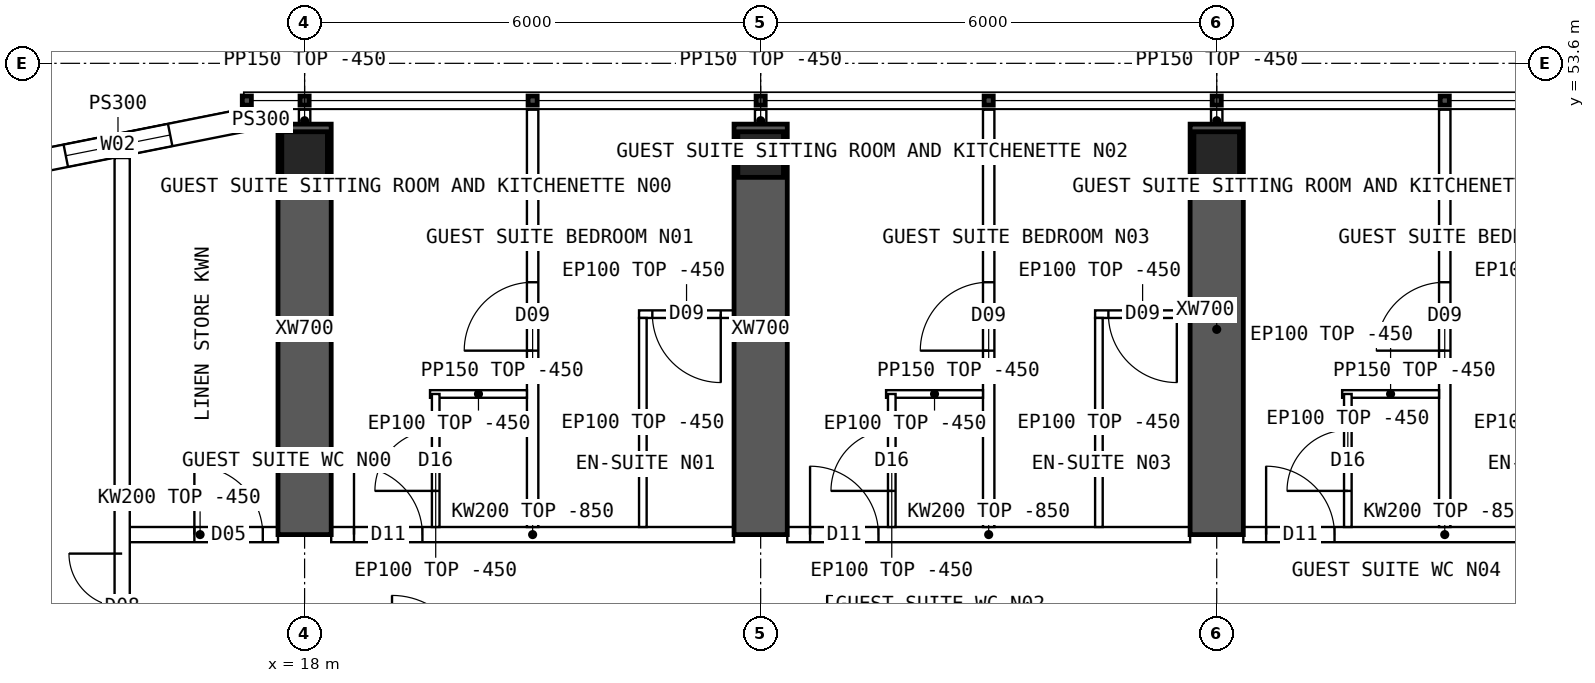
"""IFC4 building model, lengths in metres.
Left out: names, types, materials, properties, quantities, classifications, styles, units other than length and angle.
Written with IfcOpenShell. Run it as: python <this file> out.ifc"""

import sys

from ifc_helpers import new_model, si_unit, direction, frame, frame_2d, origin, origin_2d, place, context, subcontext, project, spatial, polyline, rectangle, hollow_rectangle, outline, extrude, element, fill, save


model = new_model("IFC4")
c1 = context("Model", 3, precision=1e-05, world=origin(), true_north=direction((0.0, 1.0)))
c2 = subcontext(c1, "Body", "Model", "MODEL_VIEW")
j1 = project(units=[si_unit("LENGTHUNIT", "METRE"), si_unit("PLANEANGLEUNIT", "RADIAN")], contexts=[c1])
p1 = place(None, origin())
s1 = spatial("IfcSite", under=j1, at=p1, CompositionType="ELEMENT")
p2 = place(p1, origin())
s2 = spatial("IfcBuilding", under=s1, at=p2, CompositionType="ELEMENT")
p3 = place(p2, frame((0.0, 0.0, 242.8)))
s3 = spatial("IfcBuildingStorey", under=s2, at=p3, CompositionType="ELEMENT", Elevation=242.8)
for number, where, z_axis, x_axis in (
    (1, (18.0, 52.4, 0.0), (0.0, 0.0, 1.0), (1.0, 0.0, 0.0)),
    (2, (24.0, 52.4, 0.0), (0.0, 0.0, 1.0), (1.0, 0.0, 0.0)),
    (3, (30.0, 52.4, 0.0), (0.0, 0.0, 1.0), (1.0, 0.0, 0.0)),
):
    element("IfcColumn", number, at=place(p3, frame(where, z_axis=z_axis, x_axis=x_axis)), inside=s3, PredefinedType="COLUMN", context=c2, shape_type="SweptSolid", body=[
        extrude(hollow_rectangle(XDim=0.6, YDim=0.6, WallThickness=0.06, at=origin_2d()), origin(), (0.0, 0.0, 1.0), 3.75),
    ])
for number, where, z_axis, x_axis in (
    (4, (18.0, 47.4, 0.0), (0.0, 0.0, 1.0), (0.0, 1.0, 0.0)),
    (5, (24.0, 47.4, 0.0), (0.0, 0.0, 1.0), (0.0, 1.0, 0.0)),
    (6, (30.0, 47.4, 0.0), (0.0, 0.0, 1.0), (0.0, 1.0, 0.0)),
):
    element("IfcWall", number, at=place(p3, frame(where, z_axis=z_axis, x_axis=x_axis)), inside=s3, PredefinedType="SHEAR", context=c2, shape_type="SweptSolid", body=[
        extrude(rectangle(XDim=5.4, YDim=0.7, at=frame_2d((2.7, 0.0))), origin(), (0.0, 0.0, 1.0), 3.75),
    ])
p4 = place(p3, frame((17.2, 52.85, 0.0), z_axis=(0.0, 0.0, 1.0), x_axis=(-0.98078325777, -0.195100490205, 0.0)))
e7 = element("IfcWall", 7, at=p4, inside=s3, PredefinedType="SOLIDWALL", context=c2, shape_type="SweptSolid", body=[
    extrude(outline(polyline([(-0.03, -0.15), (3.405, -0.15), (3.345, 0.15), (0.03, 0.15), (-0.03, -0.15)])), origin(), (0.0, 0.0, 1.0), 3.3),
])
p5 = place(p4, frame((0.988, 0.0, 0.9)))
e8 = element("IfcOpeningElement", 8, at=p5, cuts=e7, PredefinedType="OPENING", context=c2, shape_type="SweptSolid", body=[
    extrude(rectangle(XDim=1.4, YDim=1.8, at=frame_2d((0.7, 0.9))), frame((0.0, 0.16, 0.0), z_axis=(0.0, -1.0, 0.0), x_axis=(1.0, 0.0, 0.0)), (0.0, 0.0, 1.0), 0.32),
])
p6 = place(p3, frame((17.2, 52.85, 0.0), z_axis=(0.0, 0.0, 1.0), x_axis=(1.0, 0.0, 0.0)))
e9 = element("IfcWall", 9, at=p6, inside=s3, PredefinedType="SOLIDWALL", context=c2, shape_type="SweptSolid", body=[
    extrude(rectangle(XDim=0.45, YDim=0.3, at=frame_2d((0.225, 0.0))), origin(), (0.0, 0.0, 1.0), 3.3),
])
p7 = place(p3, frame((15.6, 47.4, 0.0), z_axis=(0.0, 0.0, 1.0), x_axis=(1.0, 0.0, 0.0)))
e10 = element("IfcWall", 10, at=p7, inside=s3, PredefinedType="SOLIDWALL", context=c2, shape_type="SweptSolid", body=[
    extrude(rectangle(XDim=2.05, YDim=0.2, at=frame_2d((1.025, 0.0))), origin(), (0.0, 0.0, 1.0), 3.3),
])
p8 = place(p7, frame((0.95, 0.0, 0.0)))
e11 = element("IfcOpeningElement", 11, at=p8, cuts=e10, PredefinedType="OPENING", context=c2, shape_type="SweptSolid", body=[
    extrude(rectangle(XDim=0.9, YDim=2.1, at=frame_2d((0.45, 1.05))), frame((0.0, 0.11, 0.0), z_axis=(0.0, -1.0, 0.0), x_axis=(1.0, 0.0, 0.0)), (0.0, 0.0, 1.0), 0.22),
])
p9 = place(p3, frame((18.35, 47.4, 0.0), z_axis=(0.0, 0.0, 1.0), x_axis=(1.0, 0.0, 0.0)))
e12 = element("IfcWall", 12, at=p9, inside=s3, PredefinedType="SOLIDWALL", context=c2, shape_type="SweptSolid", body=[
    extrude(outline(polyline([(0.0, 0.0), (5.3, 0.0), (5.3, 2.9), (0.0, 2.9), (0.0, 0.0)])), frame((0.0, 0.1, 0.0), z_axis=(0.0, -1.0, 0.0), x_axis=(1.0, 0.0, 0.0)), (0.0, 0.0, 1.0), 0.2),
])
p10 = place(p9, frame((0.3, 0.0, 0.0)))
e13 = element("IfcOpeningElement", 13, at=p10, cuts=e12, PredefinedType="OPENING", context=c2, shape_type="SweptSolid", body=[
    extrude(rectangle(XDim=0.9, YDim=2.1, at=frame_2d((0.45, 1.05))), frame((0.0, 0.11, 0.0), z_axis=(0.0, -1.0, 0.0), x_axis=(1.0, 0.0, 0.0)), (0.0, 0.0, 1.0), 0.22),
])
p11 = place(p3, frame((24.35, 47.4, 0.0), z_axis=(0.0, 0.0, 1.0), x_axis=(1.0, 0.0, 0.0)))
e14 = element("IfcWall", 14, at=p11, inside=s3, PredefinedType="SOLIDWALL", context=c2, shape_type="SweptSolid", body=[
    extrude(outline(polyline([(0.0, 0.0), (5.3, 0.0), (5.3, 2.9), (0.0, 2.9), (0.0, 0.0)])), frame((0.0, 0.1, 0.0), z_axis=(0.0, -1.0, 0.0), x_axis=(1.0, 0.0, 0.0)), (0.0, 0.0, 1.0), 0.2),
])
p12 = place(p11, frame((0.3, 0.0, 0.0)))
e15 = element("IfcOpeningElement", 15, at=p12, cuts=e14, PredefinedType="OPENING", context=c2, shape_type="SweptSolid", body=[
    extrude(rectangle(XDim=0.9, YDim=2.1, at=frame_2d((0.45, 1.05))), frame((0.0, 0.11, 0.0), z_axis=(0.0, -1.0, 0.0), x_axis=(1.0, 0.0, 0.0)), (0.0, 0.0, 1.0), 0.22),
])
p13 = place(p3, frame((30.35, 47.4, 0.0), z_axis=(0.0, 0.0, 1.0), x_axis=(1.0, 0.0, 0.0)))
e16 = element("IfcWall", 16, at=p13, inside=s3, PredefinedType="SOLIDWALL", context=c2, shape_type="SweptSolid", body=[
    extrude(outline(polyline([(0.0, 0.0), (5.3, 0.0), (5.3, 2.9), (0.0, 2.9), (0.0, 0.0)])), frame((0.0, 0.1, 0.0), z_axis=(0.0, -1.0, 0.0), x_axis=(1.0, 0.0, 0.0)), (0.0, 0.0, 1.0), 0.2),
])
p14 = place(p13, frame((0.3, 0.0, 0.0)))
e17 = element("IfcOpeningElement", 17, at=p14, cuts=e16, PredefinedType="OPENING", context=c2, shape_type="SweptSolid", body=[
    extrude(rectangle(XDim=0.9, YDim=2.1, at=frame_2d((0.45, 1.05))), frame((0.0, 0.11, 0.0), z_axis=(0.0, -1.0, 0.0), x_axis=(1.0, 0.0, 0.0)), (0.0, 0.0, 1.0), 0.22),
])
p15 = place(p3, frame((21.0, 52.99, 0.0), z_axis=(0.0, 0.0, 1.0), x_axis=(0.0, -1.0, 0.0)))
e18 = element("IfcWall", 18, at=p15, inside=s3, PredefinedType="PARTITIONING", context=c2, shape_type="SweptSolid", body=[
    extrude(outline(polyline([(0.0, 0.0), (5.49, 0.0), (5.49, 2.9), (5.442, 2.9), (5.44, 3.3), (0.792, 3.3), (0.79, 2.9), (0.392, 2.9), (0.39, 3.3), (0.0, 3.3), (0.0, 0.0)])), frame((0.0, 0.075, 0.0), z_axis=(0.0, -1.0, 0.0), x_axis=(1.0, 0.0, 0.0)), (0.0, 0.0, 1.0), 0.15),
])
p16 = place(p15, frame((2.27, 0.0, 0.0)))
e19 = element("IfcOpeningElement", 19, at=p16, cuts=e18, PredefinedType="OPENING", context=c2, shape_type="SweptSolid", body=[
    extrude(rectangle(XDim=0.9, YDim=2.1, at=frame_2d((0.45, 1.05))), frame((0.0, 0.085, 0.0), z_axis=(0.0, -1.0, 0.0), x_axis=(1.0, 0.0, 0.0)), (0.0, 0.0, 1.0), 0.17),
])
p17 = place(p3, frame((22.4, 50.3, 0.0), z_axis=(0.0, 0.0, 1.0), x_axis=(1.0, 0.0, 0.0)))
e20 = element("IfcWall", 20, at=p17, inside=s3, PredefinedType="PARTITIONING", context=c2, shape_type="SweptSolid", body=[
    extrude(rectangle(XDim=1.25, YDim=0.1, at=frame_2d((0.625, 0.0))), origin(), (0.0, 0.0, 1.0), 3.3),
])
p18 = place(p17, frame((0.175, 0.0, 0.0)))
e21 = element("IfcOpeningElement", 21, at=p18, cuts=e20, PredefinedType="OPENING", context=c2, shape_type="SweptSolid", body=[
    extrude(rectangle(XDim=0.9, YDim=2.1, at=frame_2d((0.45, 1.05))), frame((0.0, 0.06, 0.0), z_axis=(0.0, -1.0, 0.0), x_axis=(1.0, 0.0, 0.0)), (0.0, 0.0, 1.0), 0.12),
])
p19 = place(p3, frame((22.45, 50.25, 0.0), z_axis=(0.0, 0.0, 1.0), x_axis=(0.0, -1.0, 0.0)))
e22 = element("IfcWall", 22, at=p19, inside=s3, PredefinedType="PARTITIONING", context=c2, shape_type="SweptSolid", body=[
    extrude(outline(polyline([(0.0, 0.0), (2.75, 0.0), (2.75, 2.9), (2.702, 2.9), (2.7, 3.3), (0.0, 3.3), (0.0, 0.0)])), frame((0.0, 0.05, 0.0), z_axis=(0.0, -1.0, 0.0), x_axis=(1.0, 0.0, 0.0)), (0.0, 0.0, 1.0), 0.1),
])
p20 = place(p3, frame((19.65, 49.25, 0.0), z_axis=(0.0, 0.0, 1.0), x_axis=(1.0, 0.0, 0.0)))
e23 = element("IfcWall", 23, at=p20, inside=s3, PredefinedType="PARTITIONING", context=c2, shape_type="SweptSolid", body=[
    extrude(rectangle(XDim=1.275, YDim=0.1, at=frame_2d((0.638, 0.0))), origin(), (0.0, 0.0, 1.0), 3.3),
])
p21 = place(p3, frame((19.725, 49.25, 0.0), z_axis=(0.0, 0.0, 1.0), x_axis=(0.0, -1.0, 0.0)))
e24 = element("IfcWall", 24, at=p21, inside=s3, PredefinedType="PARTITIONING", context=c2, shape_type="SweptSolid", body=[
    extrude(outline(polyline([(0.0, 0.0), (1.75, 0.0), (1.75, 2.9), (1.702, 2.9), (1.7, 3.3), (0.0, 3.3), (0.0, 0.0)])), frame((0.0, 0.05, 0.0), z_axis=(0.0, -1.0, 0.0), x_axis=(1.0, 0.0, 0.0)), (0.0, 0.0, 1.0), 0.1),
])
p22 = place(p21, frame((0.475, 0.0, 0.0)))
e25 = element("IfcOpeningElement", 25, at=p22, cuts=e24, PredefinedType="OPENING", context=c2, shape_type="SweptSolid", body=[
    extrude(rectangle(XDim=0.8, YDim=2.1, at=frame_2d((0.4, 1.05))), frame((0.0, 0.06, 0.0), z_axis=(0.0, -1.0, 0.0), x_axis=(1.0, 0.0, 0.0)), (0.0, 0.0, 1.0), 0.12),
])
p23 = place(p3, frame((27.0, 52.99, 0.0), z_axis=(0.0, 0.0, 1.0), x_axis=(0.0, -1.0, 0.0)))
e26 = element("IfcWall", 26, at=p23, inside=s3, PredefinedType="PARTITIONING", context=c2, shape_type="SweptSolid", body=[
    extrude(outline(polyline([(0.0, 0.0), (5.49, 0.0), (5.49, 2.9), (5.442, 2.9), (5.44, 3.3), (0.792, 3.3), (0.79, 2.9), (0.392, 2.9), (0.39, 3.3), (0.0, 3.3), (0.0, 0.0)])), frame((0.0, 0.075, 0.0), z_axis=(0.0, -1.0, 0.0), x_axis=(1.0, 0.0, 0.0)), (0.0, 0.0, 1.0), 0.15),
])
p24 = place(p23, frame((2.27, 0.0, 0.0)))
e27 = element("IfcOpeningElement", 27, at=p24, cuts=e26, PredefinedType="OPENING", context=c2, shape_type="SweptSolid", body=[
    extrude(rectangle(XDim=0.9, YDim=2.1, at=frame_2d((0.45, 1.05))), frame((0.0, 0.085, 0.0), z_axis=(0.0, -1.0, 0.0), x_axis=(1.0, 0.0, 0.0)), (0.0, 0.0, 1.0), 0.17),
])
p25 = place(p3, frame((28.4, 50.3, 0.0), z_axis=(0.0, 0.0, 1.0), x_axis=(1.0, 0.0, 0.0)))
e28 = element("IfcWall", 28, at=p25, inside=s3, PredefinedType="PARTITIONING", context=c2, shape_type="SweptSolid", body=[
    extrude(rectangle(XDim=1.25, YDim=0.1, at=frame_2d((0.625, 0.0))), origin(), (0.0, 0.0, 1.0), 3.3),
])
p26 = place(p25, frame((0.175, 0.0, 0.0)))
e29 = element("IfcOpeningElement", 29, at=p26, cuts=e28, PredefinedType="OPENING", context=c2, shape_type="SweptSolid", body=[
    extrude(rectangle(XDim=0.9, YDim=2.1, at=frame_2d((0.45, 1.05))), frame((0.0, 0.06, 0.0), z_axis=(0.0, -1.0, 0.0), x_axis=(1.0, 0.0, 0.0)), (0.0, 0.0, 1.0), 0.12),
])
p27 = place(p3, frame((28.45, 50.25, 0.0), z_axis=(0.0, 0.0, 1.0), x_axis=(0.0, -1.0, 0.0)))
e30 = element("IfcWall", 30, at=p27, inside=s3, PredefinedType="PARTITIONING", context=c2, shape_type="SweptSolid", body=[
    extrude(outline(polyline([(0.0, 0.0), (2.75, 0.0), (2.75, 2.9), (2.702, 2.9), (2.7, 3.3), (0.0, 3.3), (0.0, 0.0)])), frame((0.0, 0.05, 0.0), z_axis=(0.0, -1.0, 0.0), x_axis=(1.0, 0.0, 0.0)), (0.0, 0.0, 1.0), 0.1),
])
p28 = place(p3, frame((25.65, 49.25, 0.0), z_axis=(0.0, 0.0, 1.0), x_axis=(1.0, 0.0, 0.0)))
e31 = element("IfcWall", 31, at=p28, inside=s3, PredefinedType="PARTITIONING", context=c2, shape_type="SweptSolid", body=[
    extrude(rectangle(XDim=1.275, YDim=0.1, at=frame_2d((0.638, 0.0))), origin(), (0.0, 0.0, 1.0), 3.3),
])
p29 = place(p3, frame((25.725, 49.25, 0.0), z_axis=(0.0, 0.0, 1.0), x_axis=(0.0, -1.0, 0.0)))
e32 = element("IfcWall", 32, at=p29, inside=s3, PredefinedType="PARTITIONING", context=c2, shape_type="SweptSolid", body=[
    extrude(outline(polyline([(0.0, 0.0), (1.75, 0.0), (1.75, 2.9), (1.702, 2.9), (1.7, 3.3), (0.0, 3.3), (0.0, 0.0)])), frame((0.0, 0.05, 0.0), z_axis=(0.0, -1.0, 0.0), x_axis=(1.0, 0.0, 0.0)), (0.0, 0.0, 1.0), 0.1),
])
p30 = place(p29, frame((0.475, 0.0, 0.0)))
e33 = element("IfcOpeningElement", 33, at=p30, cuts=e32, PredefinedType="OPENING", context=c2, shape_type="SweptSolid", body=[
    extrude(rectangle(XDim=0.8, YDim=2.1, at=frame_2d((0.4, 1.05))), frame((0.0, 0.06, 0.0), z_axis=(0.0, -1.0, 0.0), x_axis=(1.0, 0.0, 0.0)), (0.0, 0.0, 1.0), 0.12),
])
p31 = place(p3, frame((33.0, 52.99, 0.0), z_axis=(0.0, 0.0, 1.0), x_axis=(0.0, -1.0, 0.0)))
e34 = element("IfcWall", 34, at=p31, inside=s3, PredefinedType="PARTITIONING", context=c2, shape_type="SweptSolid", body=[
    extrude(outline(polyline([(0.0, 0.0), (5.49, 0.0), (5.49, 2.9), (5.442, 2.9), (5.44, 3.3), (0.792, 3.3), (0.79, 2.9), (0.392, 2.9), (0.39, 3.3), (0.0, 3.3), (0.0, 0.0)])), frame((0.0, 0.075, 0.0), z_axis=(0.0, -1.0, 0.0), x_axis=(1.0, 0.0, 0.0)), (0.0, 0.0, 1.0), 0.15),
])
p32 = place(p31, frame((2.27, 0.0, 0.0)))
e35 = element("IfcOpeningElement", 35, at=p32, cuts=e34, PredefinedType="OPENING", context=c2, shape_type="SweptSolid", body=[
    extrude(rectangle(XDim=0.9, YDim=2.1, at=frame_2d((0.45, 1.05))), frame((0.0, 0.085, 0.0), z_axis=(0.0, -1.0, 0.0), x_axis=(1.0, 0.0, 0.0)), (0.0, 0.0, 1.0), 0.17),
])
p33 = place(p3, frame((31.65, 49.25, 0.0), z_axis=(0.0, 0.0, 1.0), x_axis=(1.0, 0.0, 0.0)))
e36 = element("IfcWall", 36, at=p33, inside=s3, PredefinedType="PARTITIONING", context=c2, shape_type="SweptSolid", body=[
    extrude(rectangle(XDim=1.275, YDim=0.1, at=frame_2d((0.638, 0.0))), origin(), (0.0, 0.0, 1.0), 3.3),
])
p34 = place(p3, frame((31.725, 49.25, 0.0), z_axis=(0.0, 0.0, 1.0), x_axis=(0.0, -1.0, 0.0)))
e37 = element("IfcWall", 37, at=p34, inside=s3, PredefinedType="PARTITIONING", context=c2, shape_type="SweptSolid", body=[
    extrude(outline(polyline([(0.0, 0.0), (1.75, 0.0), (1.75, 2.9), (1.702, 2.9), (1.7, 3.3), (0.0, 3.3), (0.0, 0.0)])), frame((0.0, 0.05, 0.0), z_axis=(0.0, -1.0, 0.0), x_axis=(1.0, 0.0, 0.0)), (0.0, 0.0, 1.0), 0.1),
])
p35 = place(p34, frame((0.475, 0.0, 0.0)))
e38 = element("IfcOpeningElement", 38, at=p35, cuts=e37, PredefinedType="OPENING", context=c2, shape_type="SweptSolid", body=[
    extrude(rectangle(XDim=0.8, YDim=2.1, at=frame_2d((0.4, 1.05))), frame((0.0, 0.06, 0.0), z_axis=(0.0, -1.0, 0.0), x_axis=(1.0, 0.0, 0.0)), (0.0, 0.0, 1.0), 0.12),
])
p36 = place(p3, frame((15.6, 11.646, 0.0), z_axis=(0.0, 0.0, 1.0), x_axis=(0.0, 1.0, 0.0)))
e39 = element("IfcWall", 39, at=p36, inside=s3, PredefinedType="SOLIDWALL", context=c2, shape_type="SweptSolid", body=[
    extrude(rectangle(XDim=40.708, YDim=0.2, at=frame_2d((20.354, 0.0))), origin(), (0.0, 0.0, 1.0), 3.3),
])
p37 = place(p36, frame((21.194, 0.0, 0.0)))
e40 = element("IfcOpeningElement", 40, at=p37, cuts=e39, PredefinedType="OPENING", context=c2, shape_type="SweptSolid", body=[
    extrude(rectangle(XDim=1.2, YDim=2.1, at=frame_2d((0.6, 1.05))), frame((0.0, 0.11, 0.0), z_axis=(0.0, -1.0, 0.0), x_axis=(1.0, 0.0, 0.0)), (0.0, 0.0, 1.0), 0.22),
])
p38 = place(p36, frame((5.104, 0.0, 0.0)))
e41 = element("IfcOpeningElement", 41, at=p38, cuts=e39, PredefinedType="OPENING", context=c2, shape_type="SweptSolid", body=[
    extrude(rectangle(XDim=1.4, YDim=2.1, at=frame_2d((0.7, 1.05))), frame((0.0, 0.11, 0.0), z_axis=(0.0, -1.0, 0.0), x_axis=(1.0, 0.0, 0.0)), (0.0, 0.0, 1.0), 0.22),
])
p39 = place(p36, frame((34.104, 0.0, 0.0)))
e42 = element("IfcOpeningElement", 42, at=p39, cuts=e39, PredefinedType="OPENING", context=c2, shape_type="SweptSolid", body=[
    extrude(rectangle(XDim=1.4, YDim=2.1, at=frame_2d((0.7, 1.05))), frame((0.0, 0.11, 0.0), z_axis=(0.0, -1.0, 0.0), x_axis=(1.0, 0.0, 0.0)), (0.0, 0.0, 1.0), 0.22),
])
for number, where, z_axis, x_axis in (
    (43, (18.0, 52.7, 0.0), (0.0, 0.0, 1.0), (0.0, 1.0, 0.0)),
    (44, (24.0, 52.7, 0.0), (0.0, 0.0, 1.0), (0.0, 1.0, 0.0)),
    (45, (30.0, 52.7, 0.0), (0.0, 0.0, 1.0), (0.0, 1.0, 0.0)),
):
    element("IfcWall", number, at=place(p3, frame(where, z_axis=z_axis, x_axis=x_axis)), inside=s3, PredefinedType="PARTITIONING", context=c2, shape_type="SweptSolid", body=[
        extrude(rectangle(XDim=0.29, YDim=0.15, at=frame_2d((0.145, 0.0))), origin(), (0.0, 0.0, 1.0), 3.3),
    ])
p40 = place(p5, origin())
e46 = element("IfcWindow", 46, at=p40, inside=s3, PartitioningType="SINGLE_PANEL", PredefinedType="WINDOW", context=c2, shape_type="SweptSolid", body=[
    extrude(rectangle(XDim=1.4, YDim=1.8, at=frame_2d((0.7, 0.9))), frame((0.0, 0.03, 0.0), z_axis=(0.0, -1.0, 0.0), x_axis=(1.0, 0.0, 0.0)), (0.0, 0.0, 1.0), 0.06),
])
fill(e8, e46)
p41 = place(p10, origin())
e47 = element("IfcDoor", 47, at=p41, inside=s3, OperationType="SINGLE_SWING_LEFT", PredefinedType="DOOR", context=c2, shape_type="SweptSolid", body=[
    extrude(rectangle(XDim=0.9, YDim=2.1, at=frame_2d((0.45, 1.05))), frame((0.0, 0.025, 0.0), z_axis=(0.0, -1.0, 0.0), x_axis=(1.0, 0.0, 0.0)), (0.0, 0.0, 1.0), 0.05),
])
fill(e13, e47)
p42 = place(p18, origin())
e48 = element("IfcDoor", 48, at=p42, inside=s3, OperationType="SINGLE_SWING_RIGHT", PredefinedType="DOOR", context=c2, shape_type="SweptSolid", body=[
    extrude(rectangle(XDim=0.9, YDim=2.1, at=frame_2d((0.45, 1.05))), frame((0.0, 0.025, 0.0), z_axis=(0.0, -1.0, 0.0), x_axis=(1.0, 0.0, 0.0)), (0.0, 0.0, 1.0), 0.05),
])
fill(e21, e48)
p43 = place(p16, origin())
e49 = element("IfcDoor", 49, at=p43, inside=s3, OperationType="SINGLE_SWING_RIGHT", PredefinedType="DOOR", context=c2, shape_type="SweptSolid", body=[
    extrude(rectangle(XDim=0.9, YDim=2.1, at=frame_2d((0.45, 1.05))), frame((0.0, 0.025, 0.0), z_axis=(0.0, -1.0, 0.0), x_axis=(1.0, 0.0, 0.0)), (0.0, 0.0, 1.0), 0.05),
])
fill(e19, e49)
p44 = place(p22, origin())
e50 = element("IfcDoor", 50, at=p44, inside=s3, OperationType="SINGLE_SWING_RIGHT", PredefinedType="DOOR", context=c2, shape_type="SweptSolid", body=[
    extrude(rectangle(XDim=0.8, YDim=2.1, at=frame_2d((0.4, 1.05))), frame((0.0, 0.025, 0.0), z_axis=(0.0, -1.0, 0.0), x_axis=(1.0, 0.0, 0.0)), (0.0, 0.0, 1.0), 0.05),
])
fill(e25, e50)
p45 = place(p12, origin())
e51 = element("IfcDoor", 51, at=p45, inside=s3, OperationType="SINGLE_SWING_LEFT", PredefinedType="DOOR", context=c2, shape_type="SweptSolid", body=[
    extrude(rectangle(XDim=0.9, YDim=2.1, at=frame_2d((0.45, 1.05))), frame((0.0, 0.025, 0.0), z_axis=(0.0, -1.0, 0.0), x_axis=(1.0, 0.0, 0.0)), (0.0, 0.0, 1.0), 0.05),
])
fill(e15, e51)
p46 = place(p26, origin())
e52 = element("IfcDoor", 52, at=p46, inside=s3, OperationType="SINGLE_SWING_RIGHT", PredefinedType="DOOR", context=c2, shape_type="SweptSolid", body=[
    extrude(rectangle(XDim=0.9, YDim=2.1, at=frame_2d((0.45, 1.05))), frame((0.0, 0.025, 0.0), z_axis=(0.0, -1.0, 0.0), x_axis=(1.0, 0.0, 0.0)), (0.0, 0.0, 1.0), 0.05),
])
fill(e29, e52)
p47 = place(p24, origin())
e53 = element("IfcDoor", 53, at=p47, inside=s3, OperationType="SINGLE_SWING_RIGHT", PredefinedType="DOOR", context=c2, shape_type="SweptSolid", body=[
    extrude(rectangle(XDim=0.9, YDim=2.1, at=frame_2d((0.45, 1.05))), frame((0.0, 0.025, 0.0), z_axis=(0.0, -1.0, 0.0), x_axis=(1.0, 0.0, 0.0)), (0.0, 0.0, 1.0), 0.05),
])
fill(e27, e53)
p48 = place(p30, origin())
e54 = element("IfcDoor", 54, at=p48, inside=s3, OperationType="SINGLE_SWING_RIGHT", PredefinedType="DOOR", context=c2, shape_type="SweptSolid", body=[
    extrude(rectangle(XDim=0.8, YDim=2.1, at=frame_2d((0.4, 1.05))), frame((0.0, 0.025, 0.0), z_axis=(0.0, -1.0, 0.0), x_axis=(1.0, 0.0, 0.0)), (0.0, 0.0, 1.0), 0.05),
])
fill(e33, e54)
p49 = place(p14, origin())
e55 = element("IfcDoor", 55, at=p49, inside=s3, OperationType="SINGLE_SWING_LEFT", PredefinedType="DOOR", context=c2, shape_type="SweptSolid", body=[
    extrude(rectangle(XDim=0.9, YDim=2.1, at=frame_2d((0.45, 1.05))), frame((0.0, 0.025, 0.0), z_axis=(0.0, -1.0, 0.0), x_axis=(1.0, 0.0, 0.0)), (0.0, 0.0, 1.0), 0.05),
])
fill(e17, e55)
p50 = place(p32, origin())
e56 = element("IfcDoor", 56, at=p50, inside=s3, OperationType="SINGLE_SWING_RIGHT", PredefinedType="DOOR", context=c2, shape_type="SweptSolid", body=[
    extrude(rectangle(XDim=0.9, YDim=2.1, at=frame_2d((0.45, 1.05))), frame((0.0, 0.025, 0.0), z_axis=(0.0, -1.0, 0.0), x_axis=(1.0, 0.0, 0.0)), (0.0, 0.0, 1.0), 0.05),
])
fill(e35, e56)
p51 = place(p35, origin())
e57 = element("IfcDoor", 57, at=p51, inside=s3, OperationType="SINGLE_SWING_RIGHT", PredefinedType="DOOR", context=c2, shape_type="SweptSolid", body=[
    extrude(rectangle(XDim=0.8, YDim=2.1, at=frame_2d((0.4, 1.05))), frame((0.0, 0.025, 0.0), z_axis=(0.0, -1.0, 0.0), x_axis=(1.0, 0.0, 0.0)), (0.0, 0.0, 1.0), 0.05),
])
fill(e38, e57)
p52 = place(p39, origin())
e58 = element("IfcDoor", 58, at=p52, inside=s3, OperationType="DOUBLE_DOOR_SINGLE_SWING", PredefinedType="DOOR", context=c2, shape_type="SweptSolid", body=[
    extrude(rectangle(XDim=1.4, YDim=2.1, at=frame_2d((0.7, 1.05))), frame((0.0, 0.025, 0.0), z_axis=(0.0, -1.0, 0.0), x_axis=(1.0, 0.0, 0.0)), (0.0, 0.0, 1.0), 0.05),
])
fill(e42, e58)
p53 = place(p8, origin())
e59 = element("IfcDoor", 59, at=p53, inside=s3, OperationType="SINGLE_SWING_LEFT", PredefinedType="DOOR", context=c2, shape_type="SweptSolid", body=[
    extrude(rectangle(XDim=0.9, YDim=2.1, at=frame_2d((0.45, 1.05))), frame((0.0, 0.025, 0.0), z_axis=(0.0, -1.0, 0.0), x_axis=(1.0, 0.0, 0.0)), (0.0, 0.0, 1.0), 0.05),
])
fill(e11, e59)
save(model, sys.argv[1])
